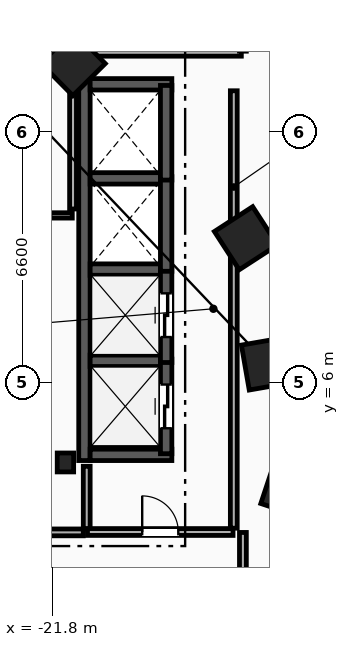
"""IFC4 building model, lengths in metres.
Left out: names, types, materials, properties, quantities, classifications, styles, units other than length and angle.
Written with IfcOpenShell. Run it as: python <this file> out.ifc"""

import sys

from ifc_helpers import new_model, si_unit, direction, frame, frame_2d, origin, origin_2d, place, context, subcontext, project, spatial, rectangle, i_section, extrude, element, fill, save


model = new_model("IFC4")
c1 = context("Model", 3, precision=1e-05, world=origin(), true_north=direction((0.0, 1.0)))
c2 = subcontext(c1, "Body", "Model", "MODEL_VIEW")
j1 = project(units=[si_unit("LENGTHUNIT", "METRE"), si_unit("PLANEANGLEUNIT", "RADIAN")], contexts=[c1])
p1 = place(None, origin())
s1 = spatial("IfcSite", under=j1, at=p1, CompositionType="ELEMENT")
p2 = place(p1, origin())
s2 = spatial("IfcBuilding", under=s1, at=p2, CompositionType="ELEMENT")
p3 = place(p2, frame((0.0, 0.0, 35.4)))
s3 = spatial("IfcBuildingStorey", under=s2, at=p3, CompositionType="ELEMENT", Elevation=35.4)
p4 = place(p3, frame((-21.45, 3.9, 0.0), z_axis=(0.0, 0.0, 1.0), x_axis=(1.0, 0.0, 0.0)))
e1 = element("IfcColumn", 1, at=p4, inside=s3, PredefinedType="COLUMN", context=c2, shape_type="SweptSolid", body=[
    extrude(i_section(OverallWidth=0.432, OverallDepth=0.498, WebThickness=0.056, FlangeThickness=0.089, FilletRadius=0.018, at=origin_2d()), origin(), (0.0, 0.0, 1.0), 3.8),
])
for number, where, z_axis, x_axis in (
    (2, (-15.55, 3.2, 0.0), (0.0, 0.0, 1.0), (0.315, 0.949, 0.0)),
    (3, (-16.125, 6.5, 0.0), (0.0, 0.0, 1.0), (-0.172, 0.985, 0.0)),
    (4, (-16.7, 9.8, 0.0), (0.0, 0.0, 1.0), (-0.544, 0.839, 0.0)),
    (5, (-21.25, 14.4, 0.0), (0.0, 0.0, 1.0), (-0.703, 0.711, 0.0)),
):
    element("IfcColumn", number, at=place(p3, frame(where, z_axis=z_axis, x_axis=x_axis)), inside=s3, PredefinedType="COLUMN", context=c2, shape_type="SweptSolid", body=[
        extrude(rectangle(XDim=1.2, YDim=1.2, at=origin_2d()), origin(), (0.0, 0.0, 1.0), 3.8),
    ])
p5 = place(p3, frame((-20.89, 2.15, 0.0), z_axis=(0.0, 0.0, 1.0), x_axis=(0.0, 1.0, 0.0)))
e6 = element("IfcWall", 6, at=p5, inside=s3, PredefinedType="PARTITIONING", context=c2, shape_type="SweptSolid", body=[
    extrude(rectangle(XDim=1.65, YDim=0.18, at=frame_2d((0.825, 0.0))), origin(), (0.0, 0.0, 1.0), 3.5),
])
p6 = place(p3, frame((-23.98, 2.06, 0.0), z_axis=(0.0, 0.0, 1.0), x_axis=(1.0, 0.0, 0.0)))
e7 = element("IfcWall", 7, at=p6, inside=s3, PredefinedType="PARTITIONING", context=c2, shape_type="SweptSolid", body=[
    extrude(rectangle(XDim=3.0, YDim=0.18, at=frame_2d((1.5, 0.0))), origin(), (0.0, 0.0, 1.0), 3.5),
])
p7 = place(p6, frame((0.9, 0.0, 0.0)))
e8 = element("IfcOpeningElement", 8, at=p7, cuts=e7, PredefinedType="OPENING", context=c2, shape_type="SweptSolid", body=[
    extrude(rectangle(XDim=1.2, YDim=2.15, at=frame_2d((0.6, 1.075))), frame((0.0, 0.1, 0.0), z_axis=(0.0, -1.0, 0.0), x_axis=(1.0, 0.0, 0.0)), (0.0, 0.0, 1.0), 0.2),
])
p8 = place(p3, frame((-20.95, 3.95, 0.0), z_axis=(0.0, 0.0, 1.0), x_axis=(0.0, 1.0, 0.0)))
e9 = element("IfcWall", 9, at=p8, inside=s3, PredefinedType="SHEAR", context=c2, shape_type="SweptSolid", body=[
    extrude(rectangle(XDim=10.05, YDim=0.3, at=frame_2d((5.025, 0.0))), origin(), (0.0, 0.0, 1.0), 3.5),
])
for number, where, z_axis, x_axis in (
    (10, (-20.8, 4.1, 0.0), (0.0, 0.0, 1.0), (1.0, 0.0, 0.0)),
    (11, (-20.8, 13.85, 0.0), (0.0, 0.0, 1.0), (1.0, 0.0, 0.0)),
):
    element("IfcWall", number, at=place(p3, frame(where, z_axis=z_axis, x_axis=x_axis)), inside=s3, PredefinedType="SHEAR", context=c2, shape_type="SweptSolid", body=[
        extrude(rectangle(XDim=2.15, YDim=0.3, at=frame_2d((1.075, 0.0))), origin(), (0.0, 0.0, 1.0), 3.5),
    ])
for number, where, z_axis, x_axis in (
    (12, (-20.8, 6.575, 0.0), (0.0, 0.0, 1.0), (1.0, 0.0, 0.0)),
    (13, (-20.8, 8.975, 0.0), (0.0, 0.0, 1.0), (1.0, 0.0, 0.0)),
    (14, (-20.8, 11.375, 0.0), (0.0, 0.0, 1.0), (1.0, 0.0, 0.0)),
):
    element("IfcWall", number, at=place(p3, frame(where, z_axis=z_axis, x_axis=x_axis)), inside=s3, PredefinedType="SHEAR", context=c2, shape_type="SweptSolid", body=[
        extrude(rectangle(XDim=1.85, YDim=0.3, at=frame_2d((0.925, 0.0))), origin(), (0.0, 0.0, 1.0), 3.5),
    ])
p9 = place(p3, frame((-18.8, 4.13, 0.0), z_axis=(0.0, 0.0, 1.0), x_axis=(0.0, 1.0, 0.0)))
e15 = element("IfcWall", 15, at=p9, inside=s3, PredefinedType="SHEAR", context=c2, shape_type="SweptSolid", body=[
    extrude(rectangle(XDim=2.49, YDim=0.3, at=frame_2d((1.245, 0.0))), origin(), (0.0, 0.0, 1.0), 3.5),
])
p10 = place(p9, frame((0.67, 0.0, 0.0)))
e16 = element("IfcOpeningElement", 16, at=p10, cuts=e15, PredefinedType="OPENING", context=c2, shape_type="SweptSolid", body=[
    extrude(rectangle(XDim=1.15, YDim=2.2, at=frame_2d((0.575, 1.1))), frame((0.0, 0.16, 0.0), z_axis=(0.0, -1.0, 0.0), x_axis=(1.0, 0.0, 0.0)), (0.0, 0.0, 1.0), 0.32),
])
p11 = place(p3, frame((-18.8, 6.53, 0.0), z_axis=(0.0, 0.0, 1.0), x_axis=(0.0, 1.0, 0.0)))
e17 = element("IfcWall", 17, at=p11, inside=s3, PredefinedType="SHEAR", context=c2, shape_type="SweptSolid", body=[
    extrude(rectangle(XDim=2.49, YDim=0.3, at=frame_2d((1.245, 0.0))), origin(), (0.0, 0.0, 1.0), 3.5),
])
p12 = place(p11, frame((0.67, 0.0, 0.0)))
e18 = element("IfcOpeningElement", 18, at=p12, cuts=e17, PredefinedType="OPENING", context=c2, shape_type="SweptSolid", body=[
    extrude(rectangle(XDim=1.15, YDim=2.2, at=frame_2d((0.575, 1.1))), frame((0.0, 0.16, 0.0), z_axis=(0.0, -1.0, 0.0), x_axis=(1.0, 0.0, 0.0)), (0.0, 0.0, 1.0), 0.32),
])
for number, where, z_axis, x_axis in (
    (19, (-18.8, 8.93, 0.0), (0.0, 0.0, 1.0), (0.0, 1.0, 0.0)),
    (20, (-18.8, 11.33, 0.0), (0.0, 0.0, 1.0), (0.0, 1.0, 0.0)),
):
    element("IfcWall", number, at=place(p3, frame(where, z_axis=z_axis, x_axis=x_axis)), inside=s3, PredefinedType="SHEAR", context=c2, shape_type="SweptSolid", body=[
        extrude(rectangle(XDim=2.49, YDim=0.3, at=frame_2d((1.245, 0.0))), origin(), (0.0, 0.0, 1.0), 3.5),
    ])
p13 = place(p3, frame((-17.02, 2.17, 0.0), z_axis=(0.0, 0.0, 1.0), x_axis=(0.0, 1.0, 0.0)))
e21 = element("IfcWall", 21, at=p13, inside=s3, PredefinedType="PARTITIONING", context=c2, shape_type="SweptSolid", body=[
    extrude(rectangle(XDim=11.51, YDim=0.18, at=frame_2d((5.755, 0.0))), origin(), (0.0, 0.0, 1.0), 3.5),
])
p14 = place(p3, frame((-20.87, 2.07, 0.0), z_axis=(0.0, 0.0, 1.0), x_axis=(1.0, 0.0, 0.0)))
e22 = element("IfcWall", 22, at=p14, inside=s3, PredefinedType="PARTITIONING", context=c2, shape_type="SweptSolid", body=[
    extrude(rectangle(XDim=3.83, YDim=0.18, at=frame_2d((1.915, 0.0))), origin(), (0.0, 0.0, 1.0), 3.5),
])
p15 = place(p14, frame((1.44, 0.0, 0.0)))
e23 = element("IfcOpeningElement", 23, at=p15, cuts=e22, PredefinedType="OPENING", context=c2, shape_type="SweptSolid", body=[
    extrude(rectangle(XDim=0.95, YDim=2.1, at=frame_2d((0.475, 1.05))), frame((0.0, 0.1, 0.0), z_axis=(0.0, -1.0, 0.0), x_axis=(1.0, 0.0, 0.0)), (0.0, 0.0, 1.0), 0.2),
])
p16 = place(p3, frame((-21.86, 10.4, 0.0), z_axis=(0.0, 0.0, 1.0), x_axis=(1.0, 0.0, 0.0)))
e24 = element("IfcWall", 24, at=p16, inside=s3, PredefinedType="PARTITIONING", context=c2, shape_type="SweptSolid", body=[
    extrude(rectangle(XDim=0.59, YDim=0.14, at=frame_2d((0.295, 0.0))), origin(), (0.0, 0.0, 1.0), 3.5),
])
p17 = place(p3, frame((-21.25, 10.57, 0.0), z_axis=(0.0, 0.0, 1.0), x_axis=(0.0, 1.0, 0.0)))
e25 = element("IfcWall", 25, at=p17, inside=s3, PredefinedType="PARTITIONING", context=c2, shape_type="SweptSolid", body=[
    extrude(rectangle(XDim=4.36, YDim=0.18, at=frame_2d((2.18, 0.0))), origin(), (0.0, 0.0, 1.0), 3.5),
])
p18 = place(p3, frame((-21.178, 14.68, 0.0), z_axis=(0.0, 0.0, 1.0), x_axis=(1.0, 0.0, 0.0)))
e26 = element("IfcWall", 26, at=p18, inside=s3, PredefinedType="PARTITIONING", context=c2, shape_type="SweptSolid", body=[
    extrude(rectangle(XDim=4.357, YDim=0.18, at=frame_2d((2.178, 0.0))), origin(), (0.0, 0.0, 1.0), 3.5),
])
p19 = place(p3, frame((-16.78, -0.329, 0.0), z_axis=(0.0, 0.0, 1.0), x_axis=(0.0, 1.0, 0.0)))
e27 = element("IfcWall", 27, at=p19, inside=s3, PredefinedType="PARTITIONING", context=c2, shape_type="SweptSolid", body=[
    extrude(rectangle(XDim=2.387, YDim=0.18, at=frame_2d((1.194, 0.0))), origin(), (0.0, 0.0, 1.0), 3.5),
])
p20 = place(p10, origin())
e28 = element("IfcDoor", 28, at=p20, inside=s3, OperationType="SLIDING_TO_LEFT", PredefinedType="TRAPDOOR", context=c2, shape_type="SweptSolid", body=[
    extrude(rectangle(XDim=1.15, YDim=2.2, at=frame_2d((0.575, 1.1))), frame((0.0, 0.025, 0.0), z_axis=(0.0, -1.0, 0.0), x_axis=(1.0, 0.0, 0.0)), (0.0, 0.0, 1.0), 0.05),
])
fill(e16, e28)
p21 = place(p12, origin())
e29 = element("IfcDoor", 29, at=p21, inside=s3, OperationType="SLIDING_TO_LEFT", PredefinedType="TRAPDOOR", context=c2, shape_type="SweptSolid", body=[
    extrude(rectangle(XDim=1.15, YDim=2.2, at=frame_2d((0.575, 1.1))), frame((0.0, 0.025, 0.0), z_axis=(0.0, -1.0, 0.0), x_axis=(1.0, 0.0, 0.0)), (0.0, 0.0, 1.0), 0.05),
])
fill(e18, e29)
p22 = place(p15, origin())
e30 = element("IfcDoor", 30, at=p22, inside=s3, OperationType="SINGLE_SWING_LEFT", PredefinedType="DOOR", context=c2, shape_type="SweptSolid", body=[
    extrude(rectangle(XDim=0.95, YDim=2.1, at=frame_2d((0.475, 1.05))), frame((0.0, 0.025, 0.0), z_axis=(0.0, -1.0, 0.0), x_axis=(1.0, 0.0, 0.0)), (0.0, 0.0, 1.0), 0.05),
])
fill(e23, e30)
save(model, sys.argv[1])
